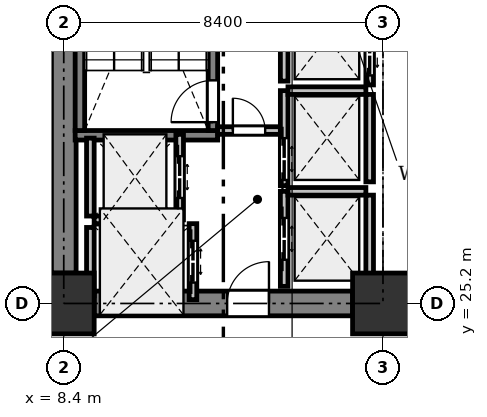
"""IFC4 building model, lengths in metres.
Left out: names, types, materials, properties, quantities, classifications, styles, units other than length and angle.
Written with IfcOpenShell. Run it as: python <this file> out.ifc"""

import sys

from ifc_helpers import new_model, si_unit, direction, frame, frame_2d, origin, origin_2d, place, context, subcontext, project, spatial, rectangle, extrude, element, fill, save


model = new_model("IFC4")
c1 = context("Model", 3, precision=1e-05, world=origin(), true_north=direction((0.0, 1.0)))
c2 = subcontext(c1, "Body", "Model", "MODEL_VIEW")
j1 = project(units=[si_unit("LENGTHUNIT", "METRE"), si_unit("PLANEANGLEUNIT", "RADIAN")], contexts=[c1])
p1 = place(None, origin())
s1 = spatial("IfcSite", under=j1, at=p1, CompositionType="ELEMENT")
p2 = place(p1, origin())
s2 = spatial("IfcBuilding", under=s1, at=p2, CompositionType="ELEMENT")
p3 = place(p2, origin())
s3 = spatial("IfcBuildingStorey", under=s2, at=p3, CompositionType="ELEMENT", Elevation=0.0)
for number, where, z_axis, x_axis in (
    (1, (8.4, 25.2, 0.0), (0.0, 0.0, 1.0), (1.0, 0.0, 0.0)),
    (2, (16.8, 25.2, 0.0), (0.0, 0.0, 1.0), (1.0, 0.0, 0.0)),
):
    element("IfcColumn", number, at=place(p3, frame(where, z_axis=z_axis, x_axis=x_axis)), inside=s3, PredefinedType="COLUMN", context=c2, shape_type="SweptSolid", body=[
        extrude(rectangle(XDim=1.6, YDim=1.6, at=origin_2d()), origin(), (0.0, 0.0, 1.0), 5.4),
    ])
p4 = place(p3, frame((8.4, 26.0, 0.0), z_axis=(0.0, 0.0, 1.0), x_axis=(0.0, 1.0, 0.0)))
e3 = element("IfcWall", 3, at=p4, inside=s3, PredefinedType="SHEAR", context=c2, shape_type="SweptSolid", body=[
    extrude(rectangle(XDim=6.8, YDim=0.65, at=frame_2d((3.4, 0.0))), origin(), (0.0, 0.0, 1.0), 5.125),
])
p5 = place(p3, frame((9.2, 25.2, 0.0), z_axis=(0.0, 0.0, 1.0), x_axis=(1.0, 0.0, 0.0)))
e4 = element("IfcWall", 4, at=p5, inside=s3, PredefinedType="SHEAR", context=c2, shape_type="SweptSolid", body=[
    extrude(rectangle(XDim=6.8, YDim=0.65, at=frame_2d((3.4, 0.0))), origin(), (0.0, 0.0, 1.0), 5.125),
])
p6 = place(p5, frame((3.5, 0.0, 0.0)))
e5 = element("IfcOpeningElement", 5, at=p6, cuts=e4, PredefinedType="OPENING", context=c2, shape_type="SweptSolid", body=[
    extrude(rectangle(XDim=1.1, YDim=2.15, at=frame_2d((0.55, 1.075))), frame((0.0, 0.335, 0.0), z_axis=(0.0, -1.0, 0.0), x_axis=(1.0, 0.0, 0.0)), (0.0, 0.0, 1.0), 0.67),
])
p7 = place(p3, frame((12.45, 29.625, 0.0), z_axis=(0.0, 0.0, 1.0), x_axis=(-1.0, 0.0, 0.0)))
e6 = element("IfcWall", 6, at=p7, inside=s3, PredefinedType="SHEAR", context=c2, shape_type="SweptSolid", body=[
    extrude(rectangle(XDim=3.75, YDim=0.25, at=frame_2d((1.875, 0.0))), origin(), (0.0, 0.0, 1.0), 5.125),
])
p8 = place(p3, frame((12.325, 29.75, 0.0), z_axis=(0.0, 0.0, 1.0), x_axis=(0.0, 1.0, 0.0)))
e7 = element("IfcWall", 7, at=p8, inside=s3, PredefinedType="SHEAR", context=c2, shape_type="SweptSolid", body=[
    extrude(rectangle(XDim=7.75, YDim=0.25, at=frame_2d((3.875, 0.0))), origin(), (0.0, 0.0, 1.0), 5.125),
])
p9 = place(p8, frame((0.22, 0.0, 0.0)))
e8 = element("IfcOpeningElement", 8, at=p9, cuts=e7, PredefinedType="OPENING", context=c2, shape_type="SweptSolid", body=[
    extrude(rectangle(XDim=1.1, YDim=2.15, at=frame_2d((0.55, 1.075))), frame((0.0, 0.135, 0.0), z_axis=(0.0, -1.0, 0.0), x_axis=(1.0, 0.0, 0.0)), (0.0, 0.0, 1.0), 0.27),
])
p10 = place(p3, frame((8.825, 29.75, 0.0), z_axis=(0.0, 0.0, 1.0), x_axis=(0.0, 1.0, 0.0)))
e9 = element("IfcWall", 9, at=p10, inside=s3, PredefinedType="SHEAR", context=c2, shape_type="SweptSolid", body=[
    extrude(rectangle(XDim=7.75, YDim=0.25, at=frame_2d((3.875, 0.0))), origin(), (0.0, 0.0, 1.0), 5.125),
])
p11 = place(p3, frame((12.45, 29.75, 0.0), z_axis=(0.0, 0.0, 1.0), x_axis=(1.0, 0.0, 0.0)))
e10 = element("IfcWall", 10, at=p11, inside=s3, PredefinedType="PARTITIONING", context=c2, shape_type="SweptSolid", body=[
    extrude(rectangle(XDim=1.65, YDim=0.2, at=frame_2d((0.825, 0.0))), origin(), (0.0, 0.0, 1.0), 5.125),
])
p12 = place(p11, frame((0.4, 0.0, 0.0)))
e11 = element("IfcOpeningElement", 11, at=p12, cuts=e10, PredefinedType="OPENING", context=c2, shape_type="SweptSolid", body=[
    extrude(rectangle(XDim=0.85, YDim=2.15, at=frame_2d((0.425, 1.075))), frame((0.0, 0.11, 0.0), z_axis=(0.0, -1.0, 0.0), x_axis=(1.0, 0.0, 0.0)), (0.0, 0.0, 1.0), 0.22),
])
p13 = place(p3, frame((11.45, 27.4, 0.0), z_axis=(0.0, 0.0, 1.0), x_axis=(0.0, 1.0, 0.0)))
e12 = element("IfcWall", 12, at=p13, inside=s3, PredefinedType="PARTITIONING", context=c2, shape_type="SweptSolid", body=[
    extrude(rectangle(XDim=2.25, YDim=0.2, at=frame_2d((1.125, 0.0))), origin(), (0.0, 0.0, 1.0), 5.125),
])
p14 = place(p13, frame((0.575, 0.0, 0.0)))
e13 = element("IfcOpeningElement", 13, at=p14, cuts=e12, PredefinedType="OPENING", context=c2, shape_type="SweptSolid", body=[
    extrude(rectangle(XDim=1.1, YDim=2.2, at=frame_2d((0.55, 1.1))), frame((0.0, 0.11, 0.0), z_axis=(0.0, -1.0, 0.0), x_axis=(1.0, 0.0, 0.0)), (0.0, 0.0, 1.0), 0.22),
])
p15 = place(p3, frame((9.1, 27.5, 0.0), z_axis=(0.0, 0.0, 1.0), x_axis=(0.0, 1.0, 0.0)))
e14 = element("IfcWall", 14, at=p15, inside=s3, PredefinedType="PARTITIONING", context=c2, shape_type="SweptSolid", body=[
    extrude(rectangle(XDim=2.05, YDim=0.2, at=frame_2d((1.025, 0.0))), origin(), (0.0, 0.0, 1.0), 5.125),
])
p16 = place(p3, frame((9.2, 27.4, 0.0), z_axis=(0.0, 0.0, 1.0), x_axis=(1.0, 0.0, 0.0)))
e15 = element("IfcWall", 15, at=p16, inside=s3, PredefinedType="PARTITIONING", context=c2, shape_type="SweptSolid", body=[
    extrude(rectangle(XDim=2.15, YDim=0.2, at=frame_2d((1.075, 0.0))), origin(), (0.0, 0.0, 1.0), 5.125),
])
p17 = place(p3, frame((11.8, 25.3, 0.0), z_axis=(0.0, 0.0, 1.0), x_axis=(0.0, 1.0, 0.0)))
e16 = element("IfcWall", 16, at=p17, inside=s3, PredefinedType="PARTITIONING", context=c2, shape_type="SweptSolid", body=[
    extrude(rectangle(XDim=2.0, YDim=0.2, at=frame_2d((1.0, 0.0))), origin(), (0.0, 0.0, 1.0), 5.125),
])
p18 = place(p17, frame((0.45, 0.0, 0.0)))
e17 = element("IfcOpeningElement", 17, at=p18, cuts=e16, PredefinedType="OPENING", context=c2, shape_type="SweptSolid", body=[
    extrude(rectangle(XDim=1.1, YDim=2.2, at=frame_2d((0.55, 1.1))), frame((0.0, 0.11, 0.0), z_axis=(0.0, -1.0, 0.0), x_axis=(1.0, 0.0, 0.0)), (0.0, 0.0, 1.0), 0.22),
])
p19 = place(p3, frame((9.1, 25.4, 0.0), z_axis=(0.0, 0.0, 1.0), x_axis=(0.0, 1.0, 0.0)))
e18 = element("IfcWall", 18, at=p19, inside=s3, PredefinedType="PARTITIONING", context=c2, shape_type="SweptSolid", body=[
    extrude(rectangle(XDim=1.8, YDim=0.2, at=frame_2d((0.9, 0.0))), origin(), (0.0, 0.0, 1.0), 5.125),
])
p20 = place(p3, frame((14.2, 25.65, 0.0), z_axis=(0.0, 0.0, 1.0), x_axis=(0.0, 1.0, 0.0)))
e19 = element("IfcWall", 19, at=p20, inside=s3, PredefinedType="PARTITIONING", context=c2, shape_type="SweptSolid", body=[
    extrude(rectangle(XDim=2.5, YDim=0.2, at=frame_2d((1.25, 0.0))), origin(), (0.0, 0.0, 1.0), 5.125),
])
p21 = place(p20, frame((0.7, 0.0, 0.0)))
e20 = element("IfcOpeningElement", 20, at=p21, cuts=e19, PredefinedType="OPENING", context=c2, shape_type="SweptSolid", body=[
    extrude(rectangle(XDim=1.1, YDim=2.2, at=frame_2d((0.55, 1.1))), frame((0.0, 0.11, 0.0), z_axis=(0.0, -1.0, 0.0), x_axis=(1.0, 0.0, 0.0)), (0.0, 0.0, 1.0), 0.22),
])
p22 = place(p3, frame((16.45, 25.75, 0.0), z_axis=(0.0, 0.0, 1.0), x_axis=(0.0, 1.0, 0.0)))
e21 = element("IfcWall", 21, at=p22, inside=s3, PredefinedType="PARTITIONING", context=c2, shape_type="SweptSolid", body=[
    extrude(rectangle(XDim=2.3, YDim=0.2, at=frame_2d((1.15, 0.0))), origin(), (0.0, 0.0, 1.0), 5.125),
])
p23 = place(p3, frame((14.3, 28.15, 0.0), z_axis=(0.0, 0.0, 1.0), x_axis=(1.0, 0.0, 0.0)))
e22 = element("IfcWall", 22, at=p23, inside=s3, PredefinedType="PARTITIONING", context=c2, shape_type="SweptSolid", body=[
    extrude(rectangle(XDim=2.05, YDim=0.2, at=frame_2d((1.025, 0.0))), origin(), (0.0, 0.0, 1.0), 5.125),
])
p24 = place(p3, frame((14.2, 28.3, 0.0), z_axis=(0.0, 0.0, 1.0), x_axis=(0.0, 1.0, 0.0)))
e23 = element("IfcWall", 23, at=p24, inside=s3, PredefinedType="PARTITIONING", context=c2, shape_type="SweptSolid", body=[
    extrude(rectangle(XDim=2.5, YDim=0.2, at=frame_2d((1.25, 0.0))), origin(), (0.0, 0.0, 1.0), 5.125),
])
p25 = place(p24, frame((0.15, 0.0, 0.0)))
e24 = element("IfcOpeningElement", 24, at=p25, cuts=e23, PredefinedType="OPENING", context=c2, shape_type="SweptSolid", body=[
    extrude(rectangle(XDim=1.1, YDim=2.2, at=frame_2d((0.55, 1.1))), frame((0.0, 0.11, 0.0), z_axis=(0.0, -1.0, 0.0), x_axis=(1.0, 0.0, 0.0)), (0.0, 0.0, 1.0), 0.22),
])
p26 = place(p3, frame((16.45, 28.4, 0.0), z_axis=(0.0, 0.0, 1.0), x_axis=(0.0, 1.0, 0.0)))
e25 = element("IfcWall", 25, at=p26, inside=s3, PredefinedType="PARTITIONING", context=c2, shape_type="SweptSolid", body=[
    extrude(rectangle(XDim=2.3, YDim=0.2, at=frame_2d((1.15, 0.0))), origin(), (0.0, 0.0, 1.0), 5.125),
])
p27 = place(p3, frame((14.3, 30.8, 0.0), z_axis=(0.0, 0.0, 1.0), x_axis=(1.0, 0.0, 0.0)))
e26 = element("IfcWall", 26, at=p27, inside=s3, PredefinedType="PARTITIONING", context=c2, shape_type="SweptSolid", body=[
    extrude(rectangle(XDim=2.05, YDim=0.2, at=frame_2d((1.025, 0.0))), origin(), (0.0, 0.0, 1.0), 5.125),
])
p28 = place(p3, frame((16.45, 30.95, 0.0), z_axis=(0.0, 0.0, 1.0), x_axis=(0.0, 1.0, 0.0)))
e27 = element("IfcWall", 27, at=p28, inside=s3, PredefinedType="PARTITIONING", context=c2, shape_type="SweptSolid", body=[
    extrude(rectangle(XDim=1.83, YDim=0.2, at=frame_2d((0.915, 0.0))), origin(), (0.0, 0.0, 1.0), 5.125),
])
p29 = place(p28, frame((0.25, 0.0, 0.0)))
e28 = element("IfcOpeningElement", 28, at=p29, cuts=e27, PredefinedType="OPENING", context=c2, shape_type="SweptSolid", body=[
    extrude(rectangle(XDim=1.1, YDim=2.2, at=frame_2d((0.55, 1.1))), frame((0.0, 0.11, 0.0), z_axis=(0.0, -1.0, 0.0), x_axis=(1.0, 0.0, 0.0)), (0.0, 0.0, 1.0), 0.22),
])
p30 = place(p3, frame((14.2, 31.05, 0.0), z_axis=(0.0, 0.0, 1.0), x_axis=(0.0, 1.0, 0.0)))
e29 = element("IfcWall", 29, at=p30, inside=s3, PredefinedType="PARTITIONING", context=c2, shape_type="SweptSolid", body=[
    extrude(rectangle(XDim=2.3, YDim=0.2, at=frame_2d((1.15, 0.0))), origin(), (0.0, 0.0, 1.0), 5.125),
])
p31 = place(p6, origin())
e30 = element("IfcDoor", 30, at=p31, inside=s3, OperationType="SINGLE_SWING_RIGHT", PredefinedType="DOOR", context=c2, shape_type="SweptSolid", body=[
    extrude(rectangle(XDim=1.1, YDim=2.15, at=frame_2d((0.55, 1.075))), frame((0.0, 0.025, 0.0), z_axis=(0.0, -1.0, 0.0), x_axis=(1.0, 0.0, 0.0)), (0.0, 0.0, 1.0), 0.05),
])
fill(e5, e30)
p32 = place(p9, origin())
e31 = element("IfcDoor", 31, at=p32, inside=s3, OperationType="SINGLE_SWING_LEFT", PredefinedType="DOOR", context=c2, shape_type="SweptSolid", body=[
    extrude(rectangle(XDim=1.1, YDim=2.15, at=frame_2d((0.55, 1.075))), frame((0.0, 0.025, 0.0), z_axis=(0.0, -1.0, 0.0), x_axis=(1.0, 0.0, 0.0)), (0.0, 0.0, 1.0), 0.05),
])
fill(e8, e31)
p33 = place(p12, origin())
e32 = element("IfcDoor", 32, at=p33, inside=s3, OperationType="SINGLE_SWING_LEFT", PredefinedType="DOOR", context=c2, shape_type="SweptSolid", body=[
    extrude(rectangle(XDim=0.85, YDim=2.15, at=frame_2d((0.425, 1.075))), frame((0.0, 0.025, 0.0), z_axis=(0.0, -1.0, 0.0), x_axis=(1.0, 0.0, 0.0)), (0.0, 0.0, 1.0), 0.05),
])
fill(e11, e32)
p34 = place(p14, origin())
e33 = element("IfcDoor", 33, at=p34, inside=s3, OperationType="DOUBLE_DOOR_SLIDING", PredefinedType="DOOR", context=c2, shape_type="SweptSolid", body=[
    extrude(rectangle(XDim=1.1, YDim=2.2, at=frame_2d((0.55, 1.1))), frame((0.0, 0.025, 0.0), z_axis=(0.0, -1.0, 0.0), x_axis=(1.0, 0.0, 0.0)), (0.0, 0.0, 1.0), 0.05),
])
fill(e13, e33)
p35 = place(p18, origin())
e34 = element("IfcDoor", 34, at=p35, inside=s3, OperationType="DOUBLE_DOOR_SLIDING", PredefinedType="DOOR", context=c2, shape_type="SweptSolid", body=[
    extrude(rectangle(XDim=1.1, YDim=2.2, at=frame_2d((0.55, 1.1))), frame((0.0, 0.025, 0.0), z_axis=(0.0, -1.0, 0.0), x_axis=(1.0, 0.0, 0.0)), (0.0, 0.0, 1.0), 0.05),
])
fill(e17, e34)
p36 = place(p21, origin())
e35 = element("IfcDoor", 35, at=p36, inside=s3, OperationType="DOUBLE_DOOR_SLIDING", PredefinedType="DOOR", context=c2, shape_type="SweptSolid", body=[
    extrude(rectangle(XDim=1.1, YDim=2.2, at=frame_2d((0.55, 1.1))), frame((0.0, 0.025, 0.0), z_axis=(0.0, -1.0, 0.0), x_axis=(1.0, 0.0, 0.0)), (0.0, 0.0, 1.0), 0.05),
])
fill(e20, e35)
p37 = place(p25, origin())
e36 = element("IfcDoor", 36, at=p37, inside=s3, OperationType="DOUBLE_DOOR_SLIDING", PredefinedType="DOOR", context=c2, shape_type="SweptSolid", body=[
    extrude(rectangle(XDim=1.1, YDim=2.2, at=frame_2d((0.55, 1.1))), frame((0.0, 0.025, 0.0), z_axis=(0.0, -1.0, 0.0), x_axis=(1.0, 0.0, 0.0)), (0.0, 0.0, 1.0), 0.05),
])
fill(e24, e36)
p38 = place(p29, origin())
e37 = element("IfcDoor", 37, at=p38, inside=s3, OperationType="DOUBLE_DOOR_SLIDING", PredefinedType="DOOR", context=c2, shape_type="SweptSolid", body=[
    extrude(rectangle(XDim=1.1, YDim=2.2, at=frame_2d((0.55, 1.1))), frame((0.0, 0.025, 0.0), z_axis=(0.0, -1.0, 0.0), x_axis=(1.0, 0.0, 0.0)), (0.0, 0.0, 1.0), 0.05),
])
fill(e28, e37)
save(model, sys.argv[1])
